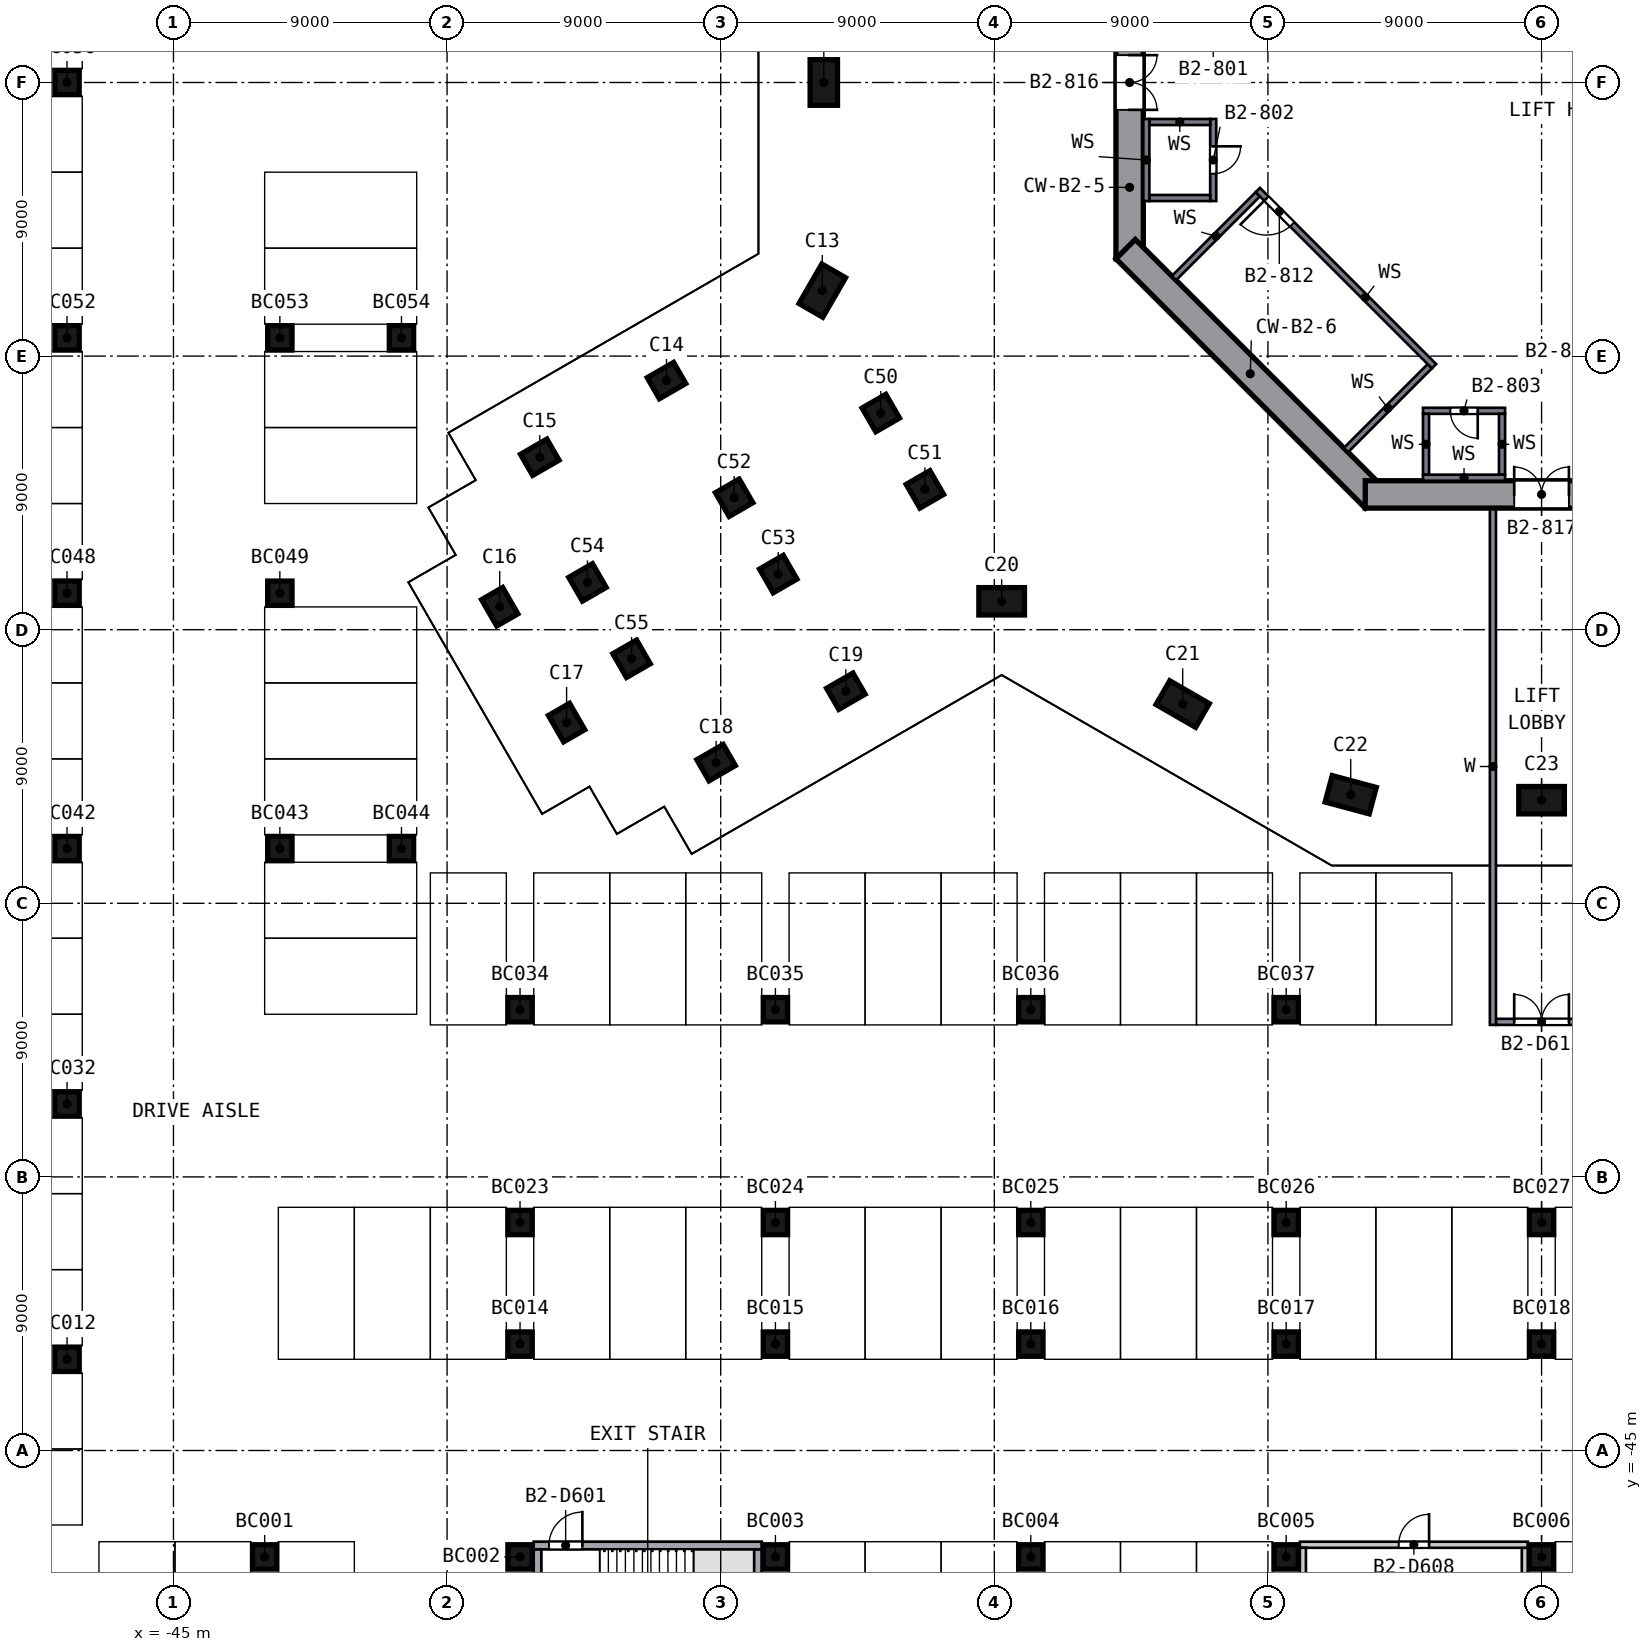
"""IFC4 building model, lengths in metres.
Left out: names, types, materials, properties, quantities, classifications, styles, units other than length and angle.
Written with IfcOpenShell. Run it as: python <this file> out.ifc"""

import sys

from ifc_helpers import new_model, si_unit, direction, frame, frame_2d, origin, origin_2d, place, context, subcontext, project, spatial, polyline, rectangle, outline, extrude, element, fill, save


model = new_model("IFC4")
c1 = context("Model", 3, precision=1e-05, world=origin(), true_north=direction((0.0, 1.0)))
c2 = subcontext(c1, "Body", "Model", "MODEL_VIEW")
j1 = project(units=[si_unit("LENGTHUNIT", "METRE"), si_unit("PLANEANGLEUNIT", "RADIAN")], contexts=[c1])
p1 = place(None, origin())
s1 = spatial("IfcSite", under=j1, at=p1, CompositionType="ELEMENT")
p2 = place(p1, origin())
s2 = spatial("IfcBuilding", under=s1, at=p2, CompositionType="ELEMENT")
p3 = place(p2, frame((0.0, 0.0, -7.8)))
s3 = spatial("IfcBuildingStorey", under=s2, at=p3, CompositionType="ELEMENT", Elevation=-7.8)
for number, where, z_axis, x_axis in (
    (1, (-23.608, 0.0, 0.0), (0.0, 0.0, 1.0), (0.0, -1.0, 0.0)),
    (2, (-23.658, -6.846, 0.0), (0.0, 0.0, 1.0), (0.5, 0.866, 0.0)),
):
    element("IfcColumn", number, at=place(p3, frame(where, z_axis=z_axis, x_axis=x_axis)), inside=s3, PredefinedType="COLUMN", context=c2, shape_type="SweptSolid", body=[
        extrude(rectangle(XDim=1.5, YDim=0.9, at=origin_2d()), origin(), (0.0, 0.0, 1.0), 3.45),
    ])
for number, where, z_axis, x_axis in (
    (3, (-28.783, -9.805, 0.0), (0.0, 0.0, 1.0), (-0.866, -0.5, 0.0)),
    (4, (-32.951, -12.327, 0.0), (0.0, 0.0, 1.0), (-0.866, -0.5, 0.0)),
    (5, (-34.269, -17.245, 0.0), (0.0, 0.0, 1.0), (0.5, -0.866, 0.0)),
    (6, (-32.069, -21.055, 0.0), (0.0, 0.0, 1.0), (0.5, -0.866, 0.0)),
    (7, (-27.151, -22.373, 0.0), (0.0, 0.0, 1.0), (0.866, 0.5, 0.0)),
    (8, (-22.883, -20.024, 0.0), (0.0, 0.0, 1.0), (0.866, 0.5, 0.0)),
):
    element("IfcColumn", number, at=place(p3, frame(where, z_axis=z_axis, x_axis=x_axis)), inside=s3, PredefinedType="COLUMN", context=c2, shape_type="SweptSolid", body=[
        extrude(rectangle(XDim=1.0, YDim=0.8, at=origin_2d()), origin(), (0.0, 0.0, 1.0), 3.45),
    ])
for number, where, z_axis, x_axis in (
    (9, (-17.758, -17.065, 0.0), (0.0, 0.0, 1.0), (-1.0, 0.0, 0.0)),
    (10, (-11.804, -20.445, 0.0), (0.0, 0.0, 1.0), (0.866, -0.5, 0.0)),
    (11, (-6.278, -23.428, 0.0), (0.0, 0.0, 1.0), (-0.966, 0.259, 0.0)),
    (12, (0.0, -23.608, 0.0), (0.0, 0.0, 1.0), (1.0, 0.0, 0.0)),
):
    element("IfcColumn", number, at=place(p3, frame(where, z_axis=z_axis, x_axis=x_axis)), inside=s3, PredefinedType="COLUMN", context=c2, shape_type="SweptSolid", body=[
        extrude(rectangle(XDim=1.5, YDim=0.9, at=origin_2d()), origin(), (0.0, 0.0, 1.0), 3.45),
    ])
for number, where, z_axis, x_axis in (
    (13, (-21.733, -10.873, 0.0), (0.0, 0.0, 1.0), (-0.866, -0.5, 0.0)),
    (14, (-20.283, -13.385, 0.0), (0.0, 0.0, 1.0), (-0.866, -0.5, 0.0)),
    (15, (-26.558, -13.659, 0.0), (0.0, 0.0, 1.0), (-0.866, -0.5, 0.0)),
    (16, (-25.108, -16.17, 0.0), (0.0, 0.0, 1.0), (-0.866, -0.5, 0.0)),
    (17, (-31.382, -16.444, 0.0), (0.0, 0.0, 1.0), (-0.866, -0.5, 0.0)),
    (18, (-29.932, -18.956, 0.0), (0.0, 0.0, 1.0), (-0.866, -0.5, 0.0)),
):
    element("IfcColumn", number, at=place(p3, frame(where, z_axis=z_axis, x_axis=x_axis)), inside=s3, PredefinedType="COLUMN", context=c2, shape_type="SweptSolid", body=[
        extrude(rectangle(XDim=0.9, YDim=0.9, at=origin_2d()), origin(), (0.0, 0.0, 1.0), 3.45),
    ])
p4 = place(p3, frame((-13.55, 5.799, 0.0), z_axis=(0.0, 0.0, 1.0), x_axis=(0.0, -1.0, 0.0)))
e19 = element("IfcWall", 19, at=p4, inside=s3, PredefinedType="SHEAR", context=c2, shape_type="SweptSolid", body=[
    extrude(rectangle(XDim=11.598, YDim=0.9, at=frame_2d((5.799, 0.0))), origin(), (0.0, 0.0, 1.0), 3.9),
])
p5 = place(p4, frame((4.899, 0.0, 0.0)))
e20 = element("IfcOpeningElement", 20, at=p5, cuts=e19, PredefinedType="OPENING", context=c2, shape_type="SweptSolid", body=[
    extrude(rectangle(XDim=1.8, YDim=2.1, at=frame_2d((0.9, 1.05))), frame((0.0, 0.46, 0.0), z_axis=(0.0, -1.0, 0.0), x_axis=(1.0, 0.0, 0.0)), (0.0, 0.0, 1.0), 0.92),
])
p6 = place(p3, frame((-13.682, -5.481, 0.0), z_axis=(0.0, 0.0, 1.0), x_axis=(0.707106781, -0.707106781, 0.0)))
e21 = element("IfcWall", 21, at=p6, inside=s3, PredefinedType="SHEAR", context=c2, shape_type="SweptSolid", body=[
    extrude(rectangle(XDim=11.598, YDim=0.9, at=frame_2d((5.799, 0.0))), origin(), (0.0, 0.0, 1.0), 3.9),
])
p7 = place(p3, frame((-5.799, -13.55, 0.0), z_axis=(0.0, 0.0, 1.0), x_axis=(1.0, 0.0, 0.0)))
e22 = element("IfcWall", 22, at=p7, inside=s3, PredefinedType="SHEAR", context=c2, shape_type="SweptSolid", body=[
    extrude(rectangle(XDim=11.598, YDim=0.9, at=frame_2d((5.799, 0.0))), origin(), (0.0, 0.0, 1.0), 3.9),
])
p8 = place(p7, frame((4.899, 0.0, 0.0)))
e23 = element("IfcOpeningElement", 23, at=p8, cuts=e22, PredefinedType="OPENING", context=c2, shape_type="SweptSolid", body=[
    extrude(rectangle(XDim=1.8, YDim=2.1, at=frame_2d((0.9, 1.05))), frame((0.0, 0.46, 0.0), z_axis=(0.0, -1.0, 0.0), x_axis=(1.0, 0.0, 0.0)), (0.0, 0.0, 1.0), 0.92),
])
for number, where, z_axis, x_axis in (
    (24, (-42.0, -48.5, 0.0), (0.0, 0.0, 1.0), (1.0, 0.0, 0.0)),
    (25, (-33.6, -48.5, 0.0), (0.0, 0.0, 1.0), (1.0, 0.0, 0.0)),
    (26, (-25.2, -48.5, 0.0), (0.0, 0.0, 1.0), (1.0, 0.0, 0.0)),
    (27, (-16.8, -48.5, 0.0), (0.0, 0.0, 1.0), (1.0, 0.0, 0.0)),
    (28, (-8.4, -48.5, 0.0), (0.0, 0.0, 1.0), (1.0, 0.0, 0.0)),
    (29, (0.0, -48.5, 0.0), (0.0, 0.0, 1.0), (1.0, 0.0, 0.0)),
    (30, (-48.5, -42.0, 0.0), (0.0, 0.0, 1.0), (1.0, 0.0, 0.0)),
    (31, (-33.6, -41.5, 0.0), (0.0, 0.0, 1.0), (1.0, 0.0, 0.0)),
    (32, (-25.2, -41.5, 0.0), (0.0, 0.0, 1.0), (1.0, 0.0, 0.0)),
    (33, (-16.8, -41.5, 0.0), (0.0, 0.0, 1.0), (1.0, 0.0, 0.0)),
    (34, (-8.4, -41.5, 0.0), (0.0, 0.0, 1.0), (1.0, 0.0, 0.0)),
    (35, (0.0, -41.5, 0.0), (0.0, 0.0, 1.0), (1.0, 0.0, 0.0)),
    (36, (-33.6, -37.5, 0.0), (0.0, 0.0, 1.0), (1.0, 0.0, 0.0)),
    (37, (-25.2, -37.5, 0.0), (0.0, 0.0, 1.0), (1.0, 0.0, 0.0)),
    (38, (-16.8, -37.5, 0.0), (0.0, 0.0, 1.0), (1.0, 0.0, 0.0)),
    (39, (-8.4, -37.5, 0.0), (0.0, 0.0, 1.0), (1.0, 0.0, 0.0)),
    (40, (0.0, -37.5, 0.0), (0.0, 0.0, 1.0), (1.0, 0.0, 0.0)),
    (41, (-48.5, -33.6, 0.0), (0.0, 0.0, 1.0), (1.0, 0.0, 0.0)),
    (42, (-33.6, -30.5, 0.0), (0.0, 0.0, 1.0), (1.0, 0.0, 0.0)),
    (43, (-25.2, -30.5, 0.0), (0.0, 0.0, 1.0), (1.0, 0.0, 0.0)),
    (44, (-16.8, -30.5, 0.0), (0.0, 0.0, 1.0), (1.0, 0.0, 0.0)),
    (45, (-8.4, -30.5, 0.0), (0.0, 0.0, 1.0), (1.0, 0.0, 0.0)),
    (46, (-48.5, -25.2, 0.0), (0.0, 0.0, 1.0), (1.0, 0.0, 0.0)),
    (47, (-41.5, -25.2, 0.0), (0.0, 0.0, 1.0), (1.0, 0.0, 0.0)),
    (48, (-37.5, -25.2, 0.0), (0.0, 0.0, 1.0), (1.0, 0.0, 0.0)),
    (49, (-48.5, -16.8, 0.0), (0.0, 0.0, 1.0), (1.0, 0.0, 0.0)),
    (50, (-41.5, -16.8, 0.0), (0.0, 0.0, 1.0), (1.0, 0.0, 0.0)),
    (51, (-48.5, -8.4, 0.0), (0.0, 0.0, 1.0), (1.0, 0.0, 0.0)),
    (52, (-41.5, -8.4, 0.0), (0.0, 0.0, 1.0), (1.0, 0.0, 0.0)),
    (53, (-37.5, -8.4, 0.0), (0.0, 0.0, 1.0), (1.0, 0.0, 0.0)),
    (54, (-48.5, 0.0, 0.0), (0.0, 0.0, 1.0), (1.0, 0.0, 0.0)),
):
    element("IfcColumn", number, at=place(p3, frame(where, z_axis=z_axis, x_axis=x_axis)), inside=s3, PredefinedType="COLUMN", context=c2, shape_type="SweptSolid", body=[
        extrude(rectangle(XDim=0.8, YDim=0.8, at=origin_2d()), origin(), (0.0, 0.0, 1.0), 3.9),
    ])
p9 = place(p3, origin())
e55 = element("IfcWall", 55, at=p9, inside=s3, PredefinedType="SOLIDWALL", context=c2, shape_type="SweptSolid", body=[
    extrude(outline(polyline([(-10.9, -1.2), (-10.9, -1.4), (-12.9, -1.4), (-12.9, -1.2), (-10.9, -1.2)])), origin(), (0.0, 0.0, 1.0), 3.45),
])
p10 = place(p3, origin())
e56 = element("IfcWall", 56, at=p10, inside=s3, PredefinedType="SOLIDWALL", context=c2, shape_type="SweptSolid", body=[
    extrude(outline(polyline([(-10.9, -3.7), (-10.9, -3.9), (-12.9, -3.9), (-12.9, -3.7), (-10.9, -3.7)])), origin(), (0.0, 0.0, 1.0), 3.45),
])
p11 = place(p3, origin())
e57 = element("IfcWall", 57, at=p11, inside=s3, PredefinedType="SOLIDWALL", context=c2, shape_type="SweptSolid", body=[
    extrude(outline(polyline([(-12.9, -1.2), (-12.9, -3.9), (-13.1, -3.9), (-13.1, -1.2), (-12.9, -1.2)])), origin(), (0.0, 0.0, 1.0), 3.45),
])
p12 = place(p3, frame((-10.8, -1.2, 0.0), z_axis=(0.0, 0.0, 1.0), x_axis=(0.0, -1.0, 0.0)))
e58 = element("IfcWall", 58, at=p12, inside=s3, PredefinedType="SOLIDWALL", context=c2, shape_type="SweptSolid", body=[
    extrude(rectangle(XDim=2.7, YDim=0.2, at=frame_2d((1.35, 0.0))), origin(), (0.0, 0.0, 1.0), 3.45),
])
p13 = place(p12, frame((0.9, 0.0, 0.0)))
e59 = element("IfcOpeningElement", 59, at=p13, cuts=e58, PredefinedType="OPENING", context=c2, shape_type="SweptSolid", body=[
    extrude(rectangle(XDim=0.9, YDim=2.1, at=frame_2d((0.45, 1.05))), frame((0.0, 0.11, 0.0), z_axis=(0.0, -1.0, 0.0), x_axis=(1.0, 0.0, 0.0)), (0.0, 0.0, 1.0), 0.22),
])
p14 = place(p3, origin())
e60 = element("IfcWall", 60, at=p14, inside=s3, PredefinedType="SOLIDWALL", context=c2, shape_type="SweptSolid", body=[
    extrude(outline(polyline([(-1.2, -10.9), (-1.2, -12.9), (-1.4, -12.9), (-1.4, -10.9), (-1.2, -10.9)])), origin(), (0.0, 0.0, 1.0), 3.45),
])
p15 = place(p3, origin())
e61 = element("IfcWall", 61, at=p15, inside=s3, PredefinedType="SOLIDWALL", context=c2, shape_type="SweptSolid", body=[
    extrude(outline(polyline([(-3.7, -10.9), (-3.7, -12.9), (-3.9, -12.9), (-3.9, -10.9), (-3.7, -10.9)])), origin(), (0.0, 0.0, 1.0), 3.45),
])
p16 = place(p3, origin())
e62 = element("IfcWall", 62, at=p16, inside=s3, PredefinedType="SOLIDWALL", context=c2, shape_type="SweptSolid", body=[
    extrude(outline(polyline([(-1.2, -12.9), (-1.2, -13.1), (-3.9, -13.1), (-3.9, -12.9), (-1.2, -12.9)])), origin(), (0.0, 0.0, 1.0), 3.45),
])
p17 = place(p3, frame((-1.2, -10.8, 0.0), z_axis=(0.0, 0.0, 1.0), x_axis=(-1.0, 0.0, 0.0)))
e63 = element("IfcWall", 63, at=p17, inside=s3, PredefinedType="SOLIDWALL", context=c2, shape_type="SweptSolid", body=[
    extrude(rectangle(XDim=2.7, YDim=0.2, at=frame_2d((1.35, 0.0))), origin(), (0.0, 0.0, 1.0), 3.45),
])
p18 = place(p17, frame((0.9, 0.0, 0.0)))
e64 = element("IfcOpeningElement", 64, at=p18, cuts=e63, PredefinedType="OPENING", context=c2, shape_type="SweptSolid", body=[
    extrude(rectangle(XDim=0.9, YDim=2.1, at=frame_2d((0.45, 1.05))), frame((0.0, 0.11, 0.0), z_axis=(0.0, -1.0, 0.0), x_axis=(1.0, 0.0, 0.0)), (0.0, 0.0, 1.0), 0.22),
])
p19 = place(p3, frame((-3.535, -9.334, 0.0), z_axis=(0.0, 0.0, 1.0), x_axis=(-0.707106781, 0.707106781, 0.0)))
e65 = element("IfcWall", 65, at=p19, inside=s3, PredefinedType="SOLIDWALL", context=c2, shape_type="SweptSolid", body=[
    extrude(rectangle(XDim=8.2, YDim=0.2, at=frame_2d((4.1, 0.0))), origin(), (0.0, 0.0, 1.0), 3.45),
])
p20 = place(p19, frame((6.6, 0.0, 0.0)))
e66 = element("IfcOpeningElement", 66, at=p20, cuts=e65, PredefinedType="OPENING", context=c2, shape_type="SweptSolid", body=[
    extrude(rectangle(XDim=1.2, YDim=2.1, at=frame_2d((0.6, 1.05))), frame((0.0, 0.11, 0.0), z_axis=(0.0, -1.0, 0.0), x_axis=(1.0, 0.0, 0.0)), (0.0, 0.0, 1.0), 0.22),
])
for number, where, z_axis, x_axis in (
    (67, (-9.334, -3.677, 0.0), (0.0, 0.0, 1.0), (-0.707, -0.707, 0.0)),
    (68, (-3.677, -9.334, 0.0), (0.0, 0.0, 1.0), (-0.707, -0.707, 0.0)),
):
    element("IfcWall", number, at=place(p3, frame(where, z_axis=z_axis, x_axis=x_axis)), inside=s3, PredefinedType="SOLIDWALL", context=c2, shape_type="SweptSolid", body=[
        extrude(rectangle(XDim=3.9, YDim=0.2, at=frame_2d((1.95, 0.0))), origin(), (0.0, 0.0, 1.0), 3.45),
    ])
p21 = place(p3, frame((-33.15, -48.125, 0.0), z_axis=(0.0, 0.0, 1.0), x_axis=(1.0, 0.0, 0.0)))
e69 = element("IfcWall", 69, at=p21, inside=s3, PredefinedType="SOLIDWALL", context=c2, shape_type="SweptSolid", body=[
    extrude(rectangle(XDim=7.5, YDim=0.25, at=frame_2d((3.75, 0.0))), origin(), (0.0, 0.0, 1.0), 3.9),
])
p22 = place(p21, frame((0.5, 0.0, 0.0)))
e70 = element("IfcOpeningElement", 70, at=p22, cuts=e69, PredefinedType="OPENING", context=c2, shape_type="SweptSolid", body=[
    extrude(rectangle(XDim=1.1, YDim=2.1, at=frame_2d((0.55, 1.05))), frame((0.0, 0.135, 0.0), z_axis=(0.0, -1.0, 0.0), x_axis=(1.0, 0.0, 0.0)), (0.0, 0.0, 1.0), 0.27),
])
for number, where, z_axis, x_axis in (
    (71, (-33.025, -52.2, 0.0), (0.0, 0.0, 1.0), (0.0, 1.0, 0.0)),
    (72, (-25.775, -52.2, 0.0), (0.0, 0.0, 1.0), (0.0, 1.0, 0.0)),
):
    element("IfcWall", number, at=place(p3, frame(where, z_axis=z_axis, x_axis=x_axis)), inside=s3, PredefinedType="SOLIDWALL", context=c2, shape_type="SweptSolid", body=[
        extrude(rectangle(XDim=3.95, YDim=0.25, at=frame_2d((1.975, 0.0))), origin(), (0.0, 0.0, 1.0), 3.9),
    ])
p23 = place(p3, frame((-7.95, -48.1, 0.0), z_axis=(0.0, 0.0, 1.0), x_axis=(1.0, 0.0, 0.0)))
e73 = element("IfcWall", 73, at=p23, inside=s3, PredefinedType="PARTITIONING", context=c2, shape_type="SweptSolid", body=[
    extrude(rectangle(XDim=7.5, YDim=0.2, at=frame_2d((3.75, 0.0))), origin(), (0.0, 0.0, 1.0), 3.45),
])
p24 = place(p23, frame((3.25, 0.0, 0.0)))
e74 = element("IfcOpeningElement", 74, at=p24, cuts=e73, PredefinedType="OPENING", context=c2, shape_type="SweptSolid", body=[
    extrude(rectangle(XDim=1.0, YDim=2.1, at=frame_2d((0.5, 1.05))), frame((0.0, 0.11, 0.0), z_axis=(0.0, -1.0, 0.0), x_axis=(1.0, 0.0, 0.0)), (0.0, 0.0, 1.0), 0.22),
])
for number, where, z_axis, x_axis in (
    (75, (-7.85, -52.8, 0.0), (0.0, 0.0, 1.0), (0.0, 1.0, 0.0)),
    (76, (-0.55, -52.8, 0.0), (0.0, 0.0, 1.0), (0.0, 1.0, 0.0)),
):
    element("IfcWall", number, at=place(p3, frame(where, z_axis=z_axis, x_axis=x_axis)), inside=s3, PredefinedType="PARTITIONING", context=c2, shape_type="SweptSolid", body=[
        extrude(rectangle(XDim=4.6, YDim=0.2, at=frame_2d((2.3, 0.0))), origin(), (0.0, 0.0, 1.0), 3.45),
    ])
p25 = place(p3, frame((-1.6, -31.0, 0.0), z_axis=(0.0, 0.0, 1.0), x_axis=(0.0, 1.0, 0.0)))
e77 = element("IfcWall", 77, at=p25, inside=s3, PredefinedType="PARTITIONING", context=c2, shape_type="SweptSolid", body=[
    extrude(rectangle(XDim=17.0, YDim=0.2, at=frame_2d((8.5, 0.0))), origin(), (0.0, 0.0, 1.0), 3.45),
])
p26 = place(p3, frame((-1.5, -30.9, 0.0), z_axis=(0.0, 0.0, 1.0), x_axis=(1.0, 0.0, 0.0)))
e78 = element("IfcWall", 78, at=p26, inside=s3, PredefinedType="PARTITIONING", context=c2, shape_type="SweptSolid", body=[
    extrude(rectangle(XDim=3.0, YDim=0.2, at=frame_2d((1.5, 0.0))), origin(), (0.0, 0.0, 1.0), 3.45),
])
p27 = place(p26, frame((0.6, 0.0, 0.0)))
e79 = element("IfcOpeningElement", 79, at=p27, cuts=e78, PredefinedType="OPENING", context=c2, shape_type="SweptSolid", body=[
    extrude(rectangle(XDim=1.8, YDim=2.1, at=frame_2d((0.9, 1.05))), frame((0.0, 0.11, 0.0), z_axis=(0.0, -1.0, 0.0), x_axis=(1.0, 0.0, 0.0)), (0.0, 0.0, 1.0), 0.22),
])
p28 = place(p13, origin())
e80 = element("IfcDoor", 80, at=p28, inside=s3, OperationType="SINGLE_SWING_LEFT", PredefinedType="DOOR", context=c2, shape_type="SweptSolid", body=[
    extrude(rectangle(XDim=0.9, YDim=2.1, at=frame_2d((0.45, 1.05))), frame((0.0, 0.025, 0.0), z_axis=(0.0, -1.0, 0.0), x_axis=(1.0, 0.0, 0.0)), (0.0, 0.0, 1.0), 0.05),
])
fill(e59, e80)
p29 = place(p18, origin())
e81 = element("IfcDoor", 81, at=p29, inside=s3, OperationType="SINGLE_SWING_LEFT", PredefinedType="DOOR", context=c2, shape_type="SweptSolid", body=[
    extrude(rectangle(XDim=0.9, YDim=2.1, at=frame_2d((0.45, 1.05))), frame((0.0, 0.025, 0.0), z_axis=(0.0, -1.0, 0.0), x_axis=(1.0, 0.0, 0.0)), (0.0, 0.0, 1.0), 0.05),
])
fill(e64, e81)
p30 = place(p20, origin())
e82 = element("IfcDoor", 82, at=p30, inside=s3, OperationType="SINGLE_SWING_RIGHT", PredefinedType="DOOR", context=c2, shape_type="SweptSolid", body=[
    extrude(rectangle(XDim=1.2, YDim=2.1, at=frame_2d((0.6, 1.05))), frame((0.0, 0.025, 0.0), z_axis=(0.0, -1.0, 0.0), x_axis=(1.0, 0.0, 0.0)), (0.0, 0.0, 1.0), 0.05),
])
fill(e66, e82)
p31 = place(p5, origin())
e83 = element("IfcDoor", 83, at=p31, inside=s3, OperationType="DOUBLE_DOOR_SINGLE_SWING", PredefinedType="DOOR", context=c2, shape_type="SweptSolid", body=[
    extrude(rectangle(XDim=1.8, YDim=2.1, at=frame_2d((0.9, 1.05))), frame((0.0, 0.025, 0.0), z_axis=(0.0, -1.0, 0.0), x_axis=(1.0, 0.0, 0.0)), (0.0, 0.0, 1.0), 0.05),
])
fill(e20, e83)
p32 = place(p8, origin())
e84 = element("IfcDoor", 84, at=p32, inside=s3, OperationType="DOUBLE_DOOR_SINGLE_SWING", PredefinedType="DOOR", context=c2, shape_type="SweptSolid", body=[
    extrude(rectangle(XDim=1.8, YDim=2.1, at=frame_2d((0.9, 1.05))), frame((0.0, 0.025, 0.0), z_axis=(0.0, -1.0, 0.0), x_axis=(1.0, 0.0, 0.0)), (0.0, 0.0, 1.0), 0.05),
])
fill(e23, e84)
p33 = place(p22, origin())
e85 = element("IfcDoor", 85, at=p33, inside=s3, OperationType="SINGLE_SWING_RIGHT", PredefinedType="DOOR", context=c2, shape_type="SweptSolid", body=[
    extrude(rectangle(XDim=1.1, YDim=2.1, at=frame_2d((0.55, 1.05))), frame((0.0, 0.025, 0.0), z_axis=(0.0, -1.0, 0.0), x_axis=(1.0, 0.0, 0.0)), (0.0, 0.0, 1.0), 0.05),
])
fill(e70, e85)
p34 = place(p24, origin())
e86 = element("IfcDoor", 86, at=p34, inside=s3, OperationType="SINGLE_SWING_RIGHT", PredefinedType="DOOR", context=c2, shape_type="SweptSolid", body=[
    extrude(rectangle(XDim=1.0, YDim=2.1, at=frame_2d((0.5, 1.05))), frame((0.0, 0.025, 0.0), z_axis=(0.0, -1.0, 0.0), x_axis=(1.0, 0.0, 0.0)), (0.0, 0.0, 1.0), 0.05),
])
fill(e74, e86)
p35 = place(p27, origin())
e87 = element("IfcDoor", 87, at=p35, inside=s3, OperationType="DOUBLE_DOOR_SINGLE_SWING", PredefinedType="DOOR", context=c2, shape_type="SweptSolid", body=[
    extrude(rectangle(XDim=1.8, YDim=2.1, at=frame_2d((0.9, 1.05))), frame((0.0, 0.025, 0.0), z_axis=(0.0, -1.0, 0.0), x_axis=(1.0, 0.0, 0.0)), (0.0, 0.0, 1.0), 0.05),
])
fill(e79, e87)
save(model, sys.argv[1])
